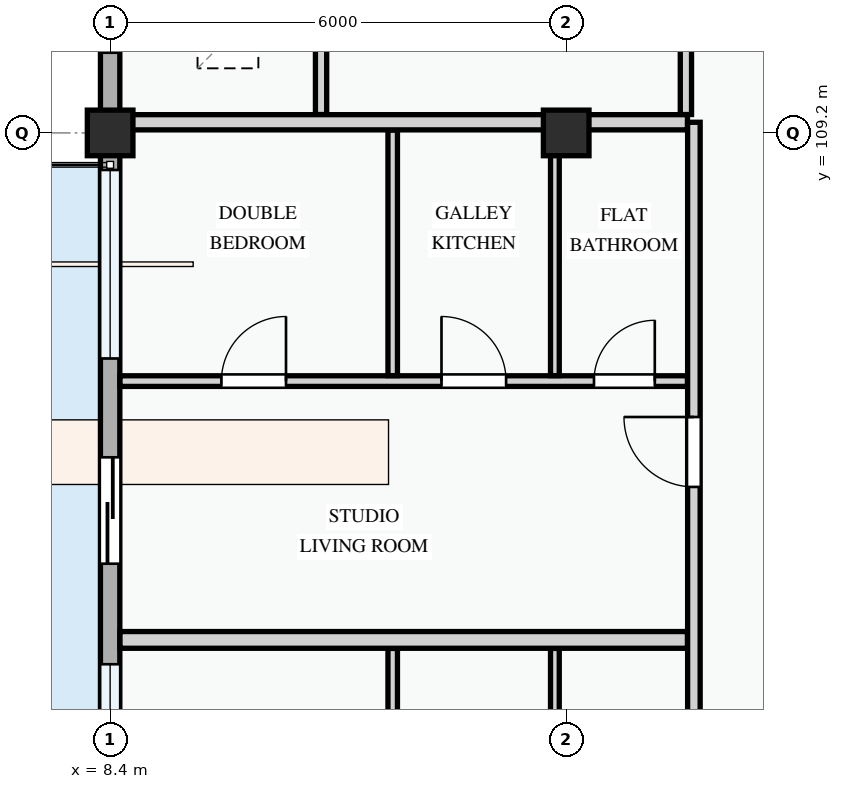
"""IFC4 building model, lengths in metres.
Left out: names, types, materials, properties, quantities, classifications, styles, units other than length and angle.
Written with IfcOpenShell. Run it as: python <this file> out.ifc"""

import sys

from ifc_helpers import new_model, si_unit, direction, frame, frame_2d, origin, origin_2d, place, context, subcontext, project, spatial, rectangle, extrude, element, fill, save


model = new_model("IFC4")
c1 = context("Model", 3, precision=1e-05, world=origin(), true_north=direction((0.0, 1.0)))
c2 = subcontext(c1, "Body", "Model", "MODEL_VIEW")
j1 = project(units=[si_unit("LENGTHUNIT", "METRE"), si_unit("PLANEANGLEUNIT", "RADIAN")], contexts=[c1])
p1 = place(None, origin())
s1 = spatial("IfcSite", under=j1, at=p1, CompositionType="ELEMENT")
p2 = place(p1, origin())
s2 = spatial("IfcBuilding", under=s1, at=p2, CompositionType="ELEMENT")
p3 = place(p2, frame((0.0, 0.0, 37.8)))
s3 = spatial("IfcBuildingStorey", under=s2, at=p3, CompositionType="ELEMENT", Elevation=37.8)
for number, where, z_axis, x_axis in (
    (1, (8.4, 109.2, 0.0), (0.0, 0.0, 1.0), (1.0, 0.0, 0.0)),
    (2, (14.4, 109.2, 0.0), (0.0, 0.0, 1.0), (1.0, 0.0, 0.0)),
):
    element("IfcColumn", number, at=place(p3, frame(where, z_axis=z_axis, x_axis=x_axis)), inside=s3, PredefinedType="COLUMN", context=c2, shape_type="SweptSolid", body=[
        extrude(rectangle(XDim=0.6, YDim=0.6, at=origin_2d()), origin(), (0.0, 0.0, 1.0), 3.3),
    ])
p4 = place(p3, frame((8.4, 115.2, 0.0), z_axis=(0.0, 0.0, 1.0), x_axis=(0.0, -1.0, 0.0)))
e3 = element("IfcWall", 3, at=p4, inside=s3, PredefinedType="STANDARD", context=c2, shape_type="SweptSolid", body=[
    extrude(rectangle(XDim=6.0, YDim=0.255, at=frame_2d((3.0, 0.0))), origin(), (0.0, 0.0, 1.0), 2.575),
])
p5 = place(p4, frame((0.545, 0.0, 0.78)))
e4 = element("IfcOpeningElement", 4, at=p5, cuts=e3, PredefinedType="OPENING", context=c2, shape_type="SweptSolid", body=[
    extrude(rectangle(XDim=0.9, YDim=1.2, at=frame_2d((0.45, 0.6))), frame((0.0, 0.137, 0.0), z_axis=(0.0, -1.0, 0.0), x_axis=(1.0, 0.0, 0.0)), (0.0, 0.0, 1.0), 0.275),
])
p6 = place(p4, frame((2.665, 0.0, 0.78)))
e5 = element("IfcOpeningElement", 5, at=p6, cuts=e3, PredefinedType="OPENING", context=c2, shape_type="SweptSolid", body=[
    extrude(rectangle(XDim=2.28, YDim=1.46, at=frame_2d((1.14, 0.73))), frame((0.0, 0.137, 0.0), z_axis=(0.0, -1.0, 0.0), x_axis=(1.0, 0.0, 0.0)), (0.0, 0.0, 1.0), 0.275),
])
p7 = place(p3, frame((8.4, 109.2, 0.0), z_axis=(0.0, 0.0, 1.0), x_axis=(0.0, -1.0, 0.0)))
e6 = element("IfcWall", 6, at=p7, inside=s3, PredefinedType="STANDARD", context=c2, shape_type="SweptSolid", body=[
    extrude(rectangle(XDim=8.4, YDim=0.255, at=frame_2d((4.2, 0.0))), origin(), (0.0, 0.0, 1.0), 2.425),
])
p8 = place(p7, frame((4.268, 0.0, 0.0)))
e7 = element("IfcOpeningElement", 7, at=p8, cuts=e6, PredefinedType="OPENING", context=c2, shape_type="SweptSolid", body=[
    extrude(rectangle(XDim=1.4, YDim=2.2, at=frame_2d((0.7, 1.1))), frame((0.0, 0.137, 0.0), z_axis=(0.0, -1.0, 0.0), x_axis=(1.0, 0.0, 0.0)), (0.0, 0.0, 1.0), 0.275),
])
p9 = place(p7, frame((0.488, 0.0, 0.78)))
e8 = element("IfcOpeningElement", 8, at=p9, cuts=e6, PredefinedType="OPENING", context=c2, shape_type="SweptSolid", body=[
    extrude(rectangle(XDim=2.48, YDim=1.46, at=frame_2d((1.24, 0.73))), frame((0.0, 0.137, 0.0), z_axis=(0.0, -1.0, 0.0), x_axis=(1.0, 0.0, 0.0)), (0.0, 0.0, 1.0), 0.275),
])
p10 = place(p7, frame((6.99, 0.0, 0.78)))
e9 = element("IfcOpeningElement", 9, at=p10, cuts=e6, PredefinedType="OPENING", context=c2, shape_type="SweptSolid", body=[
    extrude(rectangle(XDim=0.9, YDim=1.2, at=frame_2d((0.45, 0.6))), frame((0.0, 0.137, 0.0), z_axis=(0.0, -1.0, 0.0), x_axis=(1.0, 0.0, 0.0)), (0.0, 0.0, 1.0), 0.275),
])
for number, where, z_axis, x_axis in (
    (10, (11.175, 113.324, 0.0), (0.0, 0.0, 1.0), (0.0, -1.0, 0.0)),
    (11, (15.975, 113.324, 0.0), (0.0, 0.0, 1.0), (0.0, -1.0, 0.0)),
):
    element("IfcWall", number, at=place(p3, frame(where, z_axis=z_axis, x_axis=x_axis)), inside=s3, PredefinedType="PARTITIONING", context=c2, shape_type="SweptSolid", body=[
        extrude(rectangle(XDim=3.882, YDim=0.148, at=frame_2d((1.941, 0.0))), origin(), (0.0, 0.0, 1.0), 3.0),
    ])
p11 = place(p3, frame((12.118, 97.877, 0.0), z_axis=(0.0, 0.0, 1.0), x_axis=(0.0, 1.0, 0.0)))
e12 = element("IfcWall", 12, at=p11, inside=s3, PredefinedType="PARTITIONING", context=c2, shape_type="SweptSolid", body=[
    extrude(rectangle(XDim=4.541, YDim=0.125, at=frame_2d((2.271, 0.0))), origin(), (0.0, 0.0, 1.0), 3.0),
])
p12 = place(p3, frame((14.251, 97.877, 0.0), z_axis=(0.0, 0.0, 1.0), x_axis=(0.0, 1.0, 0.0)))
e13 = element("IfcWall", 13, at=p12, inside=s3, PredefinedType="PARTITIONING", context=c2, shape_type="SweptSolid", body=[
    extrude(rectangle(XDim=4.541, YDim=0.115, at=frame_2d((2.271, 0.0))), origin(), (0.0, 0.0, 1.0), 2.425),
])
p13 = place(p3, frame((8.53, 105.935, 0.0), z_axis=(0.0, 0.0, 1.0), x_axis=(1.0, 0.0, 0.0)))
e14 = element("IfcWall", 14, at=p13, inside=s3, PredefinedType="PARTITIONING", context=c2, shape_type="SweptSolid", body=[
    extrude(rectangle(XDim=7.466, YDim=0.14, at=frame_2d((3.733, 0.0))), origin(), (0.0, 0.0, 1.0), 3.0),
])
p14 = place(p13, frame((1.334, 0.0, 0.0)))
e15 = element("IfcOpeningElement", 15, at=p14, cuts=e14, PredefinedType="OPENING", context=c2, shape_type="SweptSolid", body=[
    extrude(rectangle(XDim=0.85, YDim=2.1, at=frame_2d((0.425, 1.05))), frame((0.0, 0.08, 0.0), z_axis=(0.0, -1.0, 0.0), x_axis=(1.0, 0.0, 0.0)), (0.0, 0.0, 1.0), 0.16),
])
p15 = place(p13, frame((4.23, 0.0, 0.0)))
e16 = element("IfcOpeningElement", 16, at=p15, cuts=e14, PredefinedType="OPENING", context=c2, shape_type="SweptSolid", body=[
    extrude(rectangle(XDim=0.85, YDim=2.1, at=frame_2d((0.425, 1.05))), frame((0.0, 0.08, 0.0), z_axis=(0.0, -1.0, 0.0), x_axis=(1.0, 0.0, 0.0)), (0.0, 0.0, 1.0), 0.16),
])
p16 = place(p13, frame((6.236, 0.0, 0.0)))
e17 = element("IfcOpeningElement", 17, at=p16, cuts=e14, PredefinedType="OPENING", context=c2, shape_type="SweptSolid", body=[
    extrude(rectangle(XDim=0.8, YDim=2.1, at=frame_2d((0.4, 1.05))), frame((0.0, 0.08, 0.0), z_axis=(0.0, -1.0, 0.0), x_axis=(1.0, 0.0, 0.0)), (0.0, 0.0, 1.0), 0.16),
])
p17 = place(p3, frame((12.118, 106.007, 0.0), z_axis=(0.0, 0.0, 1.0), x_axis=(0.0, 1.0, 0.0)))
e18 = element("IfcWall", 18, at=p17, inside=s3, PredefinedType="PARTITIONING", context=c2, shape_type="SweptSolid", body=[
    extrude(rectangle(XDim=3.231, YDim=0.125, at=frame_2d((1.615, 0.0))), origin(), (0.0, 0.0, 1.0), 3.0),
])
p18 = place(p3, frame((14.251, 106.007, 0.0), z_axis=(0.0, 0.0, 1.0), x_axis=(0.0, 1.0, 0.0)))
e19 = element("IfcWall", 19, at=p18, inside=s3, PredefinedType="PARTITIONING", context=c2, shape_type="SweptSolid", body=[
    extrude(rectangle(XDim=3.231, YDim=0.115, at=frame_2d((1.615, 0.0))), origin(), (0.0, 0.0, 1.0), 2.425),
])
p19 = place(p3, frame((8.53, 102.53, 0.0), z_axis=(0.0, 0.0, 1.0), x_axis=(1.0, 0.0, 0.0)))
e20 = element("IfcWall", 20, at=p19, inside=s3, PredefinedType="PARTITIONING", context=c2, shape_type="SweptSolid", body=[
    extrude(rectangle(XDim=7.466, YDim=0.22, at=frame_2d((3.733, 0.0))), origin(), (0.0, 0.0, 1.0), 3.0),
])
p20 = place(p3, frame((8.53, 109.34, 0.0), z_axis=(0.0, 0.0, 1.0), x_axis=(1.0, 0.0, 0.0)))
e21 = element("IfcWall", 21, at=p20, inside=s3, PredefinedType="PARTITIONING", context=c2, shape_type="SweptSolid", body=[
    extrude(rectangle(XDim=7.466, YDim=0.2, at=frame_2d((3.733, 0.0))), origin(), (0.0, 0.0, 1.0), 2.375),
])
p21 = place(p3, frame((16.08, 86.46, 0.0), z_axis=(0.0, 0.0, 1.0), x_axis=(0.0, 1.0, 0.0)))
e22 = element("IfcWall", 22, at=p21, inside=s3, PredefinedType="PARTITIONING", context=c2, shape_type="SweptSolid", body=[
    extrude(rectangle(XDim=22.88, YDim=0.165, at=frame_2d((11.44, 0.0))), origin(), (0.0, 0.0, 1.0), 3.0),
])
p22 = place(p21, frame((2.1, 0.0, 0.0)))
e23 = element("IfcOpeningElement", 23, at=p22, cuts=e22, PredefinedType="OPENING", context=c2, shape_type="SweptSolid", body=[
    extrude(rectangle(XDim=0.92, YDim=2.1, at=frame_2d((0.46, 1.05))), frame((0.0, 0.093, 0.0), z_axis=(0.0, -1.0, 0.0), x_axis=(1.0, 0.0, 0.0)), (0.0, 0.0, 1.0), 0.185),
])
p23 = place(p21, frame((10.135, 0.0, 0.0)))
e24 = element("IfcOpeningElement", 24, at=p23, cuts=e22, PredefinedType="OPENING", context=c2, shape_type="SweptSolid", body=[
    extrude(rectangle(XDim=0.92, YDim=2.1, at=frame_2d((0.46, 1.05))), frame((0.0, 0.093, 0.0), z_axis=(0.0, -1.0, 0.0), x_axis=(1.0, 0.0, 0.0)), (0.0, 0.0, 1.0), 0.185),
])
p24 = place(p21, frame((18.083, 0.0, 0.0)))
e25 = element("IfcOpeningElement", 25, at=p24, cuts=e22, PredefinedType="OPENING", context=c2, shape_type="SweptSolid", body=[
    extrude(rectangle(XDim=0.92, YDim=2.1, at=frame_2d((0.46, 1.05))), frame((0.0, 0.093, 0.0), z_axis=(0.0, -1.0, 0.0), x_axis=(1.0, 0.0, 0.0)), (0.0, 0.0, 1.0), 0.185),
])
p25 = place(p6, origin())
e26 = element("IfcWindow", 26, at=p25, inside=s3, PartitioningType="DOUBLE_PANEL_VERTICAL", PredefinedType="WINDOW", context=c2, shape_type="SweptSolid", body=[
    extrude(rectangle(XDim=2.28, YDim=1.46, at=frame_2d((1.14, 0.73))), frame((0.0, 0.03, 0.0), z_axis=(0.0, -1.0, 0.0), x_axis=(1.0, 0.0, 0.0)), (0.0, 0.0, 1.0), 0.06),
])
fill(e5, e26)
p26 = place(p8, frame((1.4, 0.0, 0.0), z_axis=(0.0, 0.0, 1.0), x_axis=(-1.0, 0.0, 0.0)))
e27 = element("IfcDoor", 27, at=p26, inside=s3, OperationType="SLIDING_TO_LEFT", PredefinedType="DOOR", context=c2, shape_type="SweptSolid", body=[
    extrude(rectangle(XDim=1.4, YDim=2.2, at=frame_2d((0.7, 1.1))), frame((0.0, 0.025, 0.0), z_axis=(0.0, -1.0, 0.0), x_axis=(1.0, 0.0, 0.0)), (0.0, 0.0, 1.0), 0.05),
])
fill(e7, e27)
p27 = place(p9, origin())
e28 = element("IfcWindow", 28, at=p27, inside=s3, PartitioningType="DOUBLE_PANEL_VERTICAL", PredefinedType="WINDOW", context=c2, shape_type="SweptSolid", body=[
    extrude(rectangle(XDim=2.48, YDim=1.46, at=frame_2d((1.24, 0.73))), frame((0.0, 0.03, 0.0), z_axis=(0.0, -1.0, 0.0), x_axis=(1.0, 0.0, 0.0)), (0.0, 0.0, 1.0), 0.06),
])
fill(e8, e28)
p28 = place(p10, origin())
e29 = element("IfcWindow", 29, at=p28, inside=s3, PartitioningType="SINGLE_PANEL", PredefinedType="WINDOW", context=c2, shape_type="SweptSolid", body=[
    extrude(rectangle(XDim=0.9, YDim=1.2, at=frame_2d((0.45, 0.6))), frame((0.0, 0.03, 0.0), z_axis=(0.0, -1.0, 0.0), x_axis=(1.0, 0.0, 0.0)), (0.0, 0.0, 1.0), 0.06),
])
fill(e9, e29)
p29 = place(p14, origin())
e30 = element("IfcDoor", 30, at=p29, inside=s3, OperationType="SINGLE_SWING_RIGHT", PredefinedType="DOOR", context=c2, shape_type="SweptSolid", body=[
    extrude(rectangle(XDim=0.85, YDim=2.1, at=frame_2d((0.425, 1.05))), frame((0.0, 0.025, 0.0), z_axis=(0.0, -1.0, 0.0), x_axis=(1.0, 0.0, 0.0)), (0.0, 0.0, 1.0), 0.05),
])
fill(e15, e30)
p30 = place(p15, origin())
e31 = element("IfcDoor", 31, at=p30, inside=s3, OperationType="SINGLE_SWING_LEFT", PredefinedType="DOOR", context=c2, shape_type="SweptSolid", body=[
    extrude(rectangle(XDim=0.85, YDim=2.1, at=frame_2d((0.425, 1.05))), frame((0.0, 0.025, 0.0), z_axis=(0.0, -1.0, 0.0), x_axis=(1.0, 0.0, 0.0)), (0.0, 0.0, 1.0), 0.05),
])
fill(e16, e31)
p31 = place(p16, origin())
e32 = element("IfcDoor", 32, at=p31, inside=s3, OperationType="SINGLE_SWING_RIGHT", PredefinedType="DOOR", context=c2, shape_type="SweptSolid", body=[
    extrude(rectangle(XDim=0.8, YDim=2.1, at=frame_2d((0.4, 1.05))), frame((0.0, 0.025, 0.0), z_axis=(0.0, -1.0, 0.0), x_axis=(1.0, 0.0, 0.0)), (0.0, 0.0, 1.0), 0.05),
])
fill(e17, e32)
p32 = place(p24, origin())
e33 = element("IfcDoor", 33, at=p32, inside=s3, OperationType="SINGLE_SWING_RIGHT", PredefinedType="DOOR", context=c2, shape_type="SweptSolid", body=[
    extrude(rectangle(XDim=0.92, YDim=2.1, at=frame_2d((0.46, 1.05))), frame((0.0, 0.025, 0.0), z_axis=(0.0, -1.0, 0.0), x_axis=(1.0, 0.0, 0.0)), (0.0, 0.0, 1.0), 0.05),
])
fill(e25, e33)
save(model, sys.argv[1])
